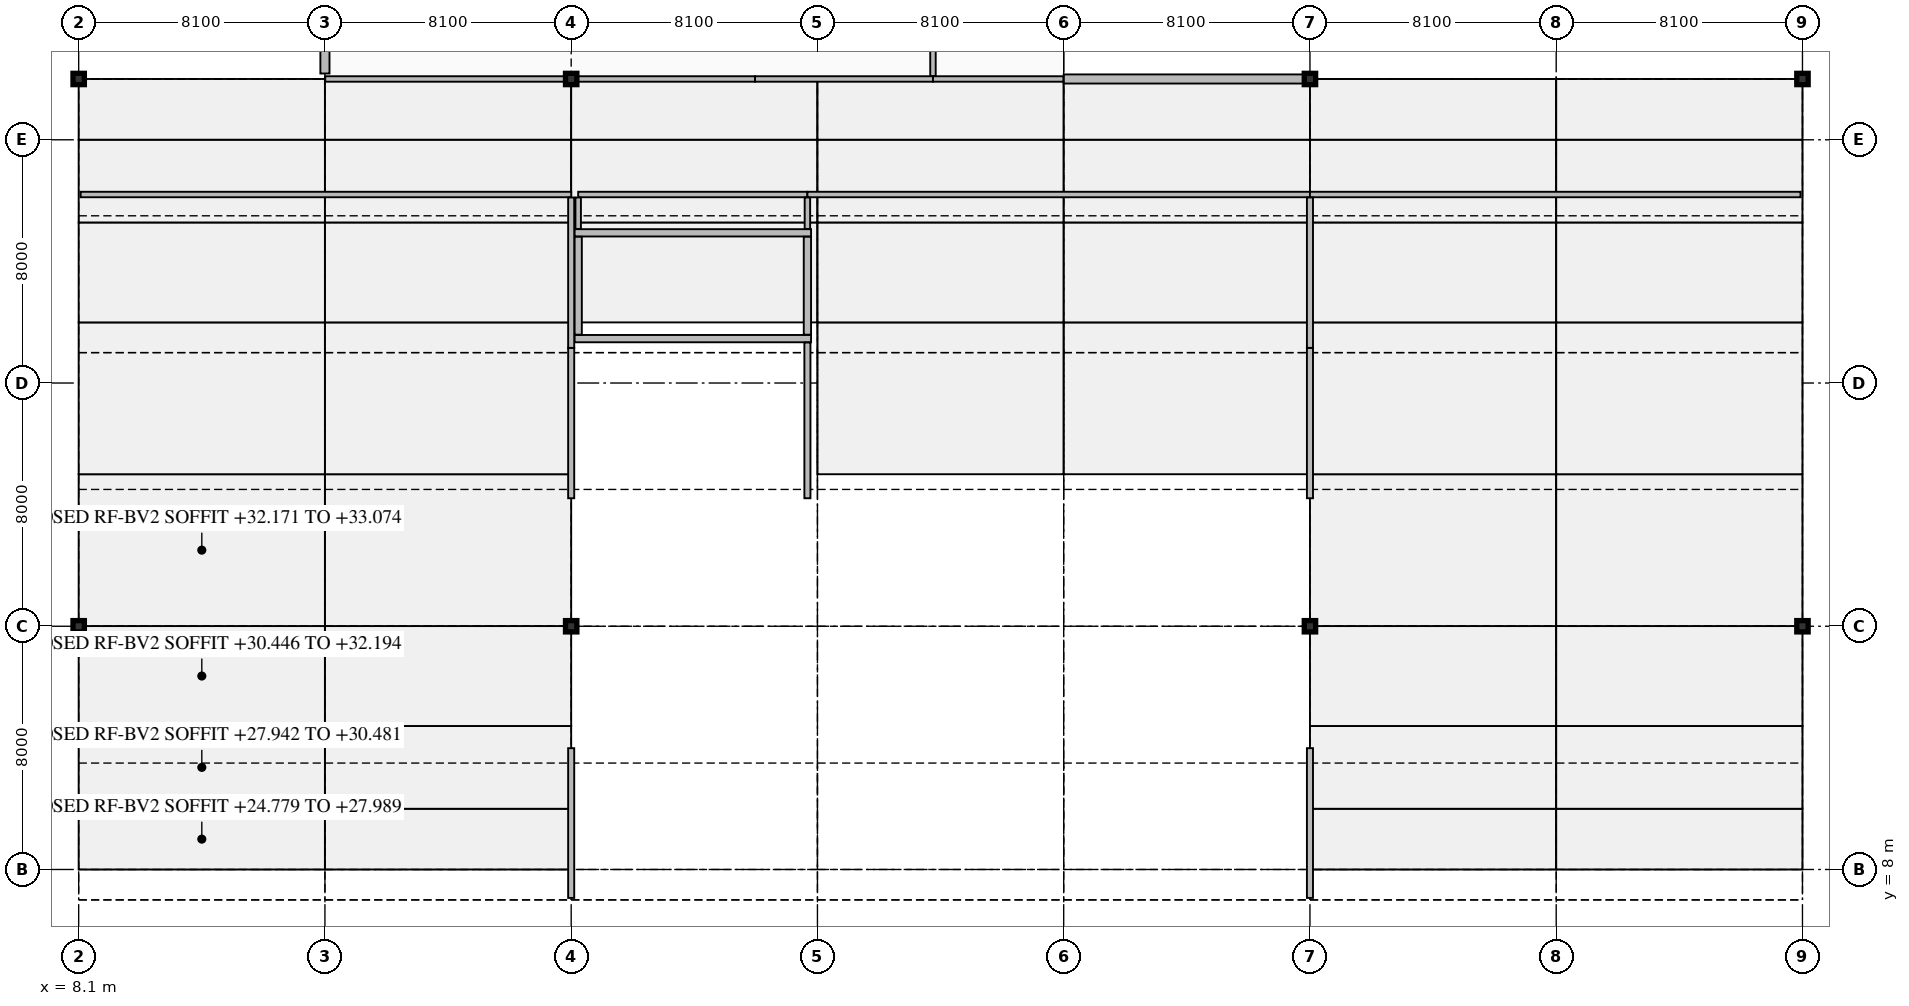
"""IFC4 building model, lengths in metres.
Left out: names, types, materials, properties, quantities, classifications, styles, units other than length and angle.
Written with IfcOpenShell. Run it as: python <this file> out.ifc"""

import sys

from ifc_helpers import new_model, si_unit, direction, frame, frame_2d, origin, origin_2d, place, context, subcontext, project, spatial, rectangle, i_section, extrude, element, fill, save


model = new_model("IFC4")
c1 = context("Model", 3, precision=1e-05, world=origin(), true_north=direction((0.0, 1.0)))
c2 = subcontext(c1, "Body", "Model", "MODEL_VIEW")
j1 = project(units=[si_unit("LENGTHUNIT", "METRE"), si_unit("PLANEANGLEUNIT", "RADIAN")], contexts=[c1])
p1 = place(None, origin())
s1 = spatial("IfcSite", under=j1, at=p1, CompositionType="ELEMENT")
p2 = place(p1, origin())
s2 = spatial("IfcBuilding", under=s1, at=p2, CompositionType="ELEMENT")
p3 = place(p2, frame((0.0, 0.0, 19.8)))
s3 = spatial("IfcBuildingStorey", under=s2, at=p3, CompositionType="ELEMENT", Elevation=19.8)
for number, where, z_axis, x_axis in (
    (1, (8.1, 16.0, 0.0), (0.0, 0.0, 1.0), (1.0, 0.0, 0.0)),
    (2, (8.1, 34.0, 0.0), (0.0, 0.0, 1.0), (1.0, 0.0, 0.0)),
    (3, (24.3, 16.0, 0.0), (0.0, 0.0, 1.0), (1.0, 0.0, 0.0)),
):
    element("IfcColumn", number, at=place(p3, frame(where, z_axis=z_axis, x_axis=x_axis)), inside=s3, PredefinedType="COLUMN", context=c2, shape_type="SweptSolid", body=[
        extrude(i_section(OverallWidth=0.374, OverallDepth=0.372, WebThickness=0.016, FlangeThickness=0.026, FilletRadius=0.016, at=origin_2d()), origin(), (0.0, 0.0, 1.0), 4.86),
    ])
p4 = place(p3, frame((24.3, 34.0, 0.0), z_axis=(0.0, 0.0, 1.0), x_axis=(1.0, 0.0, 0.0)))
e4 = element("IfcColumn", 4, at=p4, inside=s3, PredefinedType="COLUMN", context=c2, shape_type="SweptSolid", body=[
    extrude(i_section(OverallWidth=0.374, OverallDepth=0.372, WebThickness=0.016, FlangeThickness=0.026, FilletRadius=0.016, at=origin_2d()), origin(), (0.0, 0.0, 1.0), 4.76),
])
for number, where, z_axis, x_axis in (
    (5, (48.6, 16.0, 0.0), (0.0, 0.0, 1.0), (1.0, 0.0, 0.0)),
    (6, (48.6, 34.0, 0.0), (0.0, 0.0, 1.0), (1.0, 0.0, 0.0)),
    (7, (64.8, 16.0, 0.0), (0.0, 0.0, 1.0), (1.0, 0.0, 0.0)),
    (8, (64.8, 34.0, 0.0), (0.0, 0.0, 1.0), (1.0, 0.0, 0.0)),
):
    element("IfcColumn", number, at=place(p3, frame(where, z_axis=z_axis, x_axis=x_axis)), inside=s3, PredefinedType="COLUMN", context=c2, shape_type="SweptSolid", body=[
        extrude(i_section(OverallWidth=0.374, OverallDepth=0.372, WebThickness=0.016, FlangeThickness=0.026, FilletRadius=0.016, at=origin_2d()), origin(), (0.0, 0.0, 1.0), 4.86),
    ])
p5 = place(p3, frame((48.42, 34.0, 0.0), z_axis=(0.0, 0.0, 1.0), x_axis=(-1.0, 0.0, 0.0)))
e9 = element("IfcWall", 9, at=p5, inside=s3, PredefinedType="SOLIDWALL", context=c2, shape_type="SweptSolid", body=[
    extrude(rectangle(XDim=7.92, YDim=0.3, at=frame_2d((3.96, 0.0))), origin(), (0.0, 0.0, 1.0), 4.092),
])
p6 = place(p5, frame((2.7, 0.0, 0.95)))
e10 = element("IfcOpeningElement", 10, at=p6, cuts=e9, PredefinedType="OPENING", context=c2, shape_type="SweptSolid", body=[
    extrude(rectangle(XDim=2.7, YDim=0.9, at=frame_2d((1.35, 0.45))), frame((0.0, 0.16, 0.0), z_axis=(0.0, -1.0, 0.0), x_axis=(1.0, 0.0, 0.0)), (0.0, 0.0, 1.0), 0.32),
])
p7 = place(p3, frame((16.2, 49.744, 0.0), z_axis=(0.0, 0.0, 1.0), x_axis=(0.0, -1.0, 0.0)))
e11 = element("IfcWall", 11, at=p7, inside=s3, PredefinedType="SOLIDWALL", context=c2, shape_type="SweptSolid", body=[
    extrude(rectangle(XDim=15.564, YDim=0.3, at=frame_2d((7.782, 0.0))), origin(), (0.0, 0.0, 1.0), 4.289),
])
p8 = place(p7, frame((4.5, 0.0, 0.95)))
e12 = element("IfcOpeningElement", 12, at=p8, cuts=e11, PredefinedType="OPENING", context=c2, shape_type="SweptSolid", body=[
    extrude(rectangle(XDim=1.5, YDim=1.8, at=frame_2d((0.75, 0.9))), frame((0.0, 0.16, 0.0), z_axis=(0.0, -1.0, 0.0), x_axis=(1.0, 0.0, 0.0)), (0.0, 0.0, 1.0), 0.32),
])
p9 = place(p3, frame((24.41, 25.46, 0.0), z_axis=(0.0, 0.0, 1.0), x_axis=(1.0, 0.0, 0.0)))
e13 = element("IfcWall", 13, at=p9, inside=s3, PredefinedType="PARTITIONING", context=c2, shape_type="SweptSolid", body=[
    extrude(rectangle(XDim=7.78, YDim=0.24, at=frame_2d((3.89, 0.0))), origin(), (0.0, 0.0, 1.0), 4.86),
])
p10 = place(p3, frame((24.41, 28.94, 0.0), z_axis=(0.0, 0.0, 1.0), x_axis=(1.0, 0.0, 0.0)))
e14 = element("IfcWall", 14, at=p10, inside=s3, PredefinedType="PARTITIONING", context=c2, shape_type="SweptSolid", body=[
    extrude(rectangle(XDim=7.78, YDim=0.24, at=frame_2d((3.89, 0.0))), origin(), (0.0, 0.0, 1.0), 4.86),
])
p11 = place(p10, frame((0.54, 0.0, 0.0)))
e15 = element("IfcOpeningElement", 15, at=p11, cuts=e14, PredefinedType="OPENING", context=c2, shape_type="SweptSolid", body=[
    extrude(rectangle(XDim=1.1, YDim=2.2, at=frame_2d((0.55, 1.1))), frame((0.0, 0.13, 0.0), z_axis=(0.0, -1.0, 0.0), x_axis=(1.0, 0.0, 0.0)), (0.0, 0.0, 1.0), 0.26),
])
p12 = place(p3, frame((24.53, 25.59, 0.0), z_axis=(0.0, 0.0, 1.0), x_axis=(0.0, 1.0, 0.0)))
e16 = element("IfcWall", 16, at=p12, inside=s3, PredefinedType="PARTITIONING", context=c2, shape_type="SweptSolid", body=[
    extrude(rectangle(XDim=3.22, YDim=0.24, at=frame_2d((1.61, 0.0))), origin(), (0.0, 0.0, 1.0), 4.173),
])
p13 = place(p3, frame((32.07, 25.59, 0.0), z_axis=(0.0, 0.0, 1.0), x_axis=(0.0, 1.0, 0.0)))
e17 = element("IfcWall", 17, at=p13, inside=s3, PredefinedType="PARTITIONING", context=c2, shape_type="SweptSolid", body=[
    extrude(rectangle(XDim=3.22, YDim=0.24, at=frame_2d((1.61, 0.0))), origin(), (0.0, 0.0, 1.0), 4.617),
])
p14 = place(p3, frame((8.165, 30.2, 0.0), z_axis=(0.0, 0.0, 1.0), x_axis=(1.0, 0.0, 0.0)))
e18 = element("IfcWall", 18, at=p14, inside=s3, PredefinedType="PARTITIONING", context=c2, shape_type="SweptSolid", body=[
    extrude(rectangle(XDim=16.135, YDim=0.18, at=frame_2d((8.067, 0.0))), origin(), (0.0, 0.0, 1.0), 4.86),
])
p15 = place(p14, frame((7.468, 0.0, 0.0)))
e19 = element("IfcOpeningElement", 19, at=p15, cuts=e18, PredefinedType="OPENING", context=c2, shape_type="SweptSolid", body=[
    extrude(rectangle(XDim=1.2, YDim=2.25, at=frame_2d((0.6, 1.125))), frame((0.0, 0.1, 0.0), z_axis=(0.0, -1.0, 0.0), x_axis=(1.0, 0.0, 0.0)), (0.0, 0.0, 1.0), 0.2),
])
p16 = place(p3, frame((16.21, 34.0, 0.0), z_axis=(0.0, 0.0, 1.0), x_axis=(1.0, 0.0, 0.0)))
e20 = element("IfcWall", 20, at=p16, inside=s3, PredefinedType="PARTITIONING", context=c2, shape_type="SweptSolid", body=[
    extrude(rectangle(XDim=7.895, YDim=0.18, at=frame_2d((3.948, 0.0))), origin(), (0.0, 0.0, 1.0), 4.092),
])
p17 = place(p3, frame((24.495, 34.0, 0.0), z_axis=(0.0, 0.0, 1.0), x_axis=(1.0, 0.0, 0.0)))
e21 = element("IfcWall", 21, at=p17, inside=s3, PredefinedType="PARTITIONING", context=c2, shape_type="SweptSolid", body=[
    extrude(rectangle(XDim=5.852, YDim=0.18, at=frame_2d((2.926, 0.0))), origin(), (0.0, 0.0, 1.0), 4.092),
])
p18 = place(p3, frame((30.347, 34.0, 0.0), z_axis=(0.0, 0.0, 1.0), x_axis=(1.0, 0.0, 0.0)))
e22 = element("IfcWall", 22, at=p18, inside=s3, PredefinedType="PARTITIONING", context=c2, shape_type="SweptSolid", body=[
    extrude(rectangle(XDim=5.853, YDim=0.18, at=frame_2d((2.926, 0.0))), origin(), (0.0, 0.0, 1.0), 4.092),
])
p19 = place(p3, frame((24.53, 30.2, 0.0), z_axis=(0.0, 0.0, 1.0), x_axis=(1.0, 0.0, 0.0)))
e23 = element("IfcWall", 23, at=p19, inside=s3, PredefinedType="PARTITIONING", context=c2, shape_type="SweptSolid", body=[
    extrude(rectangle(XDim=7.54, YDim=0.18, at=frame_2d((3.77, 0.0))), origin(), (0.0, 0.0, 1.0), 4.86),
])
p20 = place(p19, frame((3.22, 0.0, 0.0)))
e24 = element("IfcOpeningElement", 24, at=p20, cuts=e23, PredefinedType="OPENING", context=c2, shape_type="SweptSolid", body=[
    extrude(rectangle(XDim=1.1, YDim=2.2, at=frame_2d((0.55, 1.1))), frame((0.0, 0.1, 0.0), z_axis=(0.0, -1.0, 0.0), x_axis=(1.0, 0.0, 0.0)), (0.0, 0.0, 1.0), 0.2),
])
p21 = place(p3, frame((32.07, 30.2, 0.0), z_axis=(0.0, 0.0, 1.0), x_axis=(1.0, 0.0, 0.0)))
e25 = element("IfcWall", 25, at=p21, inside=s3, PredefinedType="PARTITIONING", context=c2, shape_type="SweptSolid", body=[
    extrude(rectangle(XDim=16.53, YDim=0.18, at=frame_2d((8.265, 0.0))), origin(), (0.0, 0.0, 1.0), 4.86),
])
p22 = place(p21, frame((7.715, 0.0, 0.0)))
e26 = element("IfcOpeningElement", 26, at=p22, cuts=e25, PredefinedType="OPENING", context=c2, shape_type="SweptSolid", body=[
    extrude(rectangle(XDim=1.1, YDim=2.2, at=frame_2d((0.55, 1.1))), frame((0.0, 0.1, 0.0), z_axis=(0.0, -1.0, 0.0), x_axis=(1.0, 0.0, 0.0)), (0.0, 0.0, 1.0), 0.2),
])
p23 = place(p3, frame((36.2, 34.0, 0.0), z_axis=(0.0, 0.0, 1.0), x_axis=(1.0, 0.0, 0.0)))
e27 = element("IfcWall", 27, at=p23, inside=s3, PredefinedType="PARTITIONING", context=c2, shape_type="SweptSolid", body=[
    extrude(rectangle(XDim=4.29, YDim=0.18, at=frame_2d((2.145, 0.0))), origin(), (0.0, 0.0, 1.0), 4.092),
])
p24 = place(p23, frame((1.545, 0.0, 0.0)))
e28 = element("IfcOpeningElement", 28, at=p24, cuts=e27, PredefinedType="OPENING", context=c2, shape_type="SweptSolid", body=[
    extrude(rectangle(XDim=1.2, YDim=2.2, at=frame_2d((0.6, 1.1))), frame((0.0, 0.1, 0.0), z_axis=(0.0, -1.0, 0.0), x_axis=(1.0, 0.0, 0.0)), (0.0, 0.0, 1.0), 0.2),
])
p25 = place(p3, frame((48.6, 30.2, 0.0), z_axis=(0.0, 0.0, 1.0), x_axis=(1.0, 0.0, 0.0)))
e29 = element("IfcWall", 29, at=p25, inside=s3, PredefinedType="PARTITIONING", context=c2, shape_type="SweptSolid", body=[
    extrude(rectangle(XDim=16.135, YDim=0.18, at=frame_2d((8.067, 0.0))), origin(), (0.0, 0.0, 1.0), 4.86),
])
p26 = place(p25, frame((7.468, 0.0, 0.0)))
e30 = element("IfcOpeningElement", 30, at=p26, cuts=e29, PredefinedType="OPENING", context=c2, shape_type="SweptSolid", body=[
    extrude(rectangle(XDim=1.2, YDim=2.25, at=frame_2d((0.6, 1.125))), frame((0.0, 0.1, 0.0), z_axis=(0.0, -1.0, 0.0), x_axis=(1.0, 0.0, 0.0)), (0.0, 0.0, 1.0), 0.2),
])
p27 = place(p3, frame((24.3, 7.065, 0.0), z_axis=(0.0, 0.0, 1.0), x_axis=(0.0, 1.0, 0.0)))
e31 = element("IfcWall", 31, at=p27, inside=s3, PredefinedType="PARTITIONING", context=c2, shape_type="SweptSolid", body=[
    extrude(rectangle(XDim=4.925, YDim=0.2, at=frame_2d((2.462, 0.0))), origin(), (0.0, 0.0, 1.0), 3.952),
])
for number, where, z_axis, x_axis in (
    (32, (24.3, 20.21, 0.0), (0.0, 0.0, 1.0), (0.0, 1.0, 0.0)),
    (33, (24.3, 25.156, 0.0), (0.0, 0.0, 1.0), (0.0, 1.0, 0.0)),
):
    element("IfcWall", number, at=place(p3, frame(where, z_axis=z_axis, x_axis=x_axis)), inside=s3, PredefinedType="PARTITIONING", context=c2, shape_type="SweptSolid", body=[
        extrude(rectangle(XDim=4.946, YDim=0.2, at=frame_2d((2.473, 0.0))), origin(), (0.0, 0.0, 1.0), 4.173),
    ])
p28 = place(p3, frame((24.53, 29.068, 0.0), z_axis=(0.0, 0.0, 1.0), x_axis=(0.0, 1.0, 0.0)))
e34 = element("IfcWall", 34, at=p28, inside=s3, PredefinedType="PARTITIONING", context=c2, shape_type="SweptSolid", body=[
    extrude(rectangle(XDim=1.034, YDim=0.18, at=frame_2d((0.517, 0.0))), origin(), (0.0, 0.0, 1.0), 4.173),
])
p29 = place(p3, frame((32.07, 20.21, 0.0), z_axis=(0.0, 0.0, 1.0), x_axis=(0.0, 1.0, 0.0)))
e35 = element("IfcWall", 35, at=p29, inside=s3, PredefinedType="PARTITIONING", context=c2, shape_type="SweptSolid", body=[
    extrude(rectangle(XDim=5.122, YDim=0.2, at=frame_2d((2.561, 0.0))), origin(), (0.0, 0.0, 1.0), 4.617),
])
p30 = place(p3, frame((32.07, 29.068, 0.0), z_axis=(0.0, 0.0, 1.0), x_axis=(0.0, 1.0, 0.0)))
e36 = element("IfcWall", 36, at=p30, inside=s3, PredefinedType="PARTITIONING", context=c2, shape_type="SweptSolid", body=[
    extrude(rectangle(XDim=1.034, YDim=0.18, at=frame_2d((0.517, 0.0))), origin(), (0.0, 0.0, 1.0), 4.617),
])
p31 = place(p3, frame((36.2, 34.098, 0.0), z_axis=(0.0, 0.0, 1.0), x_axis=(0.0, 1.0, 0.0)))
e37 = element("IfcWall", 37, at=p31, inside=s3, PredefinedType="PARTITIONING", context=c2, shape_type="SweptSolid", body=[
    extrude(rectangle(XDim=19.004, YDim=0.18, at=frame_2d((9.502, 0.0))), origin(), (0.0, 0.0, 1.0), 4.405),
])
p32 = place(p31, frame((9.002, 0.0, 0.0)))
e38 = element("IfcOpeningElement", 38, at=p32, cuts=e37, PredefinedType="OPENING", context=c2, shape_type="SweptSolid", body=[
    extrude(rectangle(XDim=1.0, YDim=2.2, at=frame_2d((0.5, 1.1))), frame((0.0, 0.1, 0.0), z_axis=(0.0, -1.0, 0.0), x_axis=(1.0, 0.0, 0.0)), (0.0, 0.0, 1.0), 0.2),
])
p33 = place(p3, frame((48.6, 7.065, 0.0), z_axis=(0.0, 0.0, 1.0), x_axis=(0.0, 1.0, 0.0)))
e39 = element("IfcWall", 39, at=p33, inside=s3, PredefinedType="PARTITIONING", context=c2, shape_type="SweptSolid", body=[
    extrude(rectangle(XDim=4.925, YDim=0.2, at=frame_2d((2.462, 0.0))), origin(), (0.0, 0.0, 1.0), 3.952),
])
for number, where, z_axis, x_axis in (
    (40, (48.6, 20.21, 0.0), (0.0, 0.0, 1.0), (0.0, 1.0, 0.0)),
    (41, (48.6, 25.156, 0.0), (0.0, 0.0, 1.0), (0.0, 1.0, 0.0)),
):
    element("IfcWall", number, at=place(p3, frame(where, z_axis=z_axis, x_axis=x_axis)), inside=s3, PredefinedType="PARTITIONING", context=c2, shape_type="SweptSolid", body=[
        extrude(rectangle(XDim=4.946, YDim=0.2, at=frame_2d((2.473, 0.0))), origin(), (0.0, 0.0, 1.0), 4.173),
    ])
p34 = place(p6, origin())
e42 = element("IfcWindow", 42, at=p34, inside=s3, PartitioningType="TRIPLE_PANEL_VERTICAL", PredefinedType="WINDOW", context=c2, shape_type="SweptSolid", body=[
    extrude(rectangle(XDim=2.7, YDim=0.9, at=frame_2d((1.35, 0.45))), frame((0.0, 0.03, 0.0), z_axis=(0.0, -1.0, 0.0), x_axis=(1.0, 0.0, 0.0)), (0.0, 0.0, 1.0), 0.06),
])
fill(e10, e42)
p35 = place(p11, frame((1.1, 0.0, 0.0), z_axis=(0.0, 0.0, 1.0), x_axis=(-1.0, 0.0, 0.0)))
e43 = element("IfcDoor", 43, at=p35, inside=s3, OperationType="SINGLE_SWING_RIGHT", PredefinedType="DOOR", context=c2, shape_type="SweptSolid", body=[
    extrude(rectangle(XDim=1.1, YDim=2.2, at=frame_2d((0.55, 1.1))), frame((0.0, 0.025, 0.0), z_axis=(0.0, -1.0, 0.0), x_axis=(1.0, 0.0, 0.0)), (0.0, 0.0, 1.0), 0.05),
])
fill(e15, e43)
p36 = place(p15, frame((1.2, 0.0, 0.0), z_axis=(0.0, 0.0, 1.0), x_axis=(-1.0, 0.0, 0.0)))
e44 = element("IfcDoor", 44, at=p36, inside=s3, OperationType="SINGLE_SWING_LEFT", PredefinedType="DOOR", context=c2, shape_type="SweptSolid", body=[
    extrude(rectangle(XDim=1.2, YDim=2.25, at=frame_2d((0.6, 1.125))), frame((0.0, 0.025, 0.0), z_axis=(0.0, -1.0, 0.0), x_axis=(1.0, 0.0, 0.0)), (0.0, 0.0, 1.0), 0.05),
])
fill(e19, e44)
p37 = place(p20, origin())
e45 = element("IfcDoor", 45, at=p37, inside=s3, OperationType="SINGLE_SWING_RIGHT", PredefinedType="DOOR", context=c2, shape_type="SweptSolid", body=[
    extrude(rectangle(XDim=1.1, YDim=2.2, at=frame_2d((0.55, 1.1))), frame((0.0, 0.025, 0.0), z_axis=(0.0, -1.0, 0.0), x_axis=(1.0, 0.0, 0.0)), (0.0, 0.0, 1.0), 0.05),
])
fill(e24, e45)
p38 = place(p22, frame((1.1, 0.0, 0.0), z_axis=(0.0, 0.0, 1.0), x_axis=(-1.0, 0.0, 0.0)))
e46 = element("IfcDoor", 46, at=p38, inside=s3, OperationType="SINGLE_SWING_RIGHT", PredefinedType="DOOR", context=c2, shape_type="SweptSolid", body=[
    extrude(rectangle(XDim=1.1, YDim=2.2, at=frame_2d((0.55, 1.1))), frame((0.0, 0.025, 0.0), z_axis=(0.0, -1.0, 0.0), x_axis=(1.0, 0.0, 0.0)), (0.0, 0.0, 1.0), 0.05),
])
fill(e26, e46)
p39 = place(p24, frame((1.2, 0.0, 0.0), z_axis=(0.0, 0.0, 1.0), x_axis=(-1.0, 0.0, 0.0)))
e47 = element("IfcDoor", 47, at=p39, inside=s3, OperationType="SINGLE_SWING_LEFT", PredefinedType="DOOR", context=c2, shape_type="SweptSolid", body=[
    extrude(rectangle(XDim=1.2, YDim=2.2, at=frame_2d((0.6, 1.1))), frame((0.0, 0.025, 0.0), z_axis=(0.0, -1.0, 0.0), x_axis=(1.0, 0.0, 0.0)), (0.0, 0.0, 1.0), 0.05),
])
fill(e28, e47)
p40 = place(p26, frame((1.2, 0.0, 0.0), z_axis=(0.0, 0.0, 1.0), x_axis=(-1.0, 0.0, 0.0)))
e48 = element("IfcDoor", 48, at=p40, inside=s3, OperationType="SINGLE_SWING_RIGHT", PredefinedType="DOOR", context=c2, shape_type="SweptSolid", body=[
    extrude(rectangle(XDim=1.2, YDim=2.25, at=frame_2d((0.6, 1.125))), frame((0.0, 0.025, 0.0), z_axis=(0.0, -1.0, 0.0), x_axis=(1.0, 0.0, 0.0)), (0.0, 0.0, 1.0), 0.05),
])
fill(e30, e48)
save(model, sys.argv[1])
